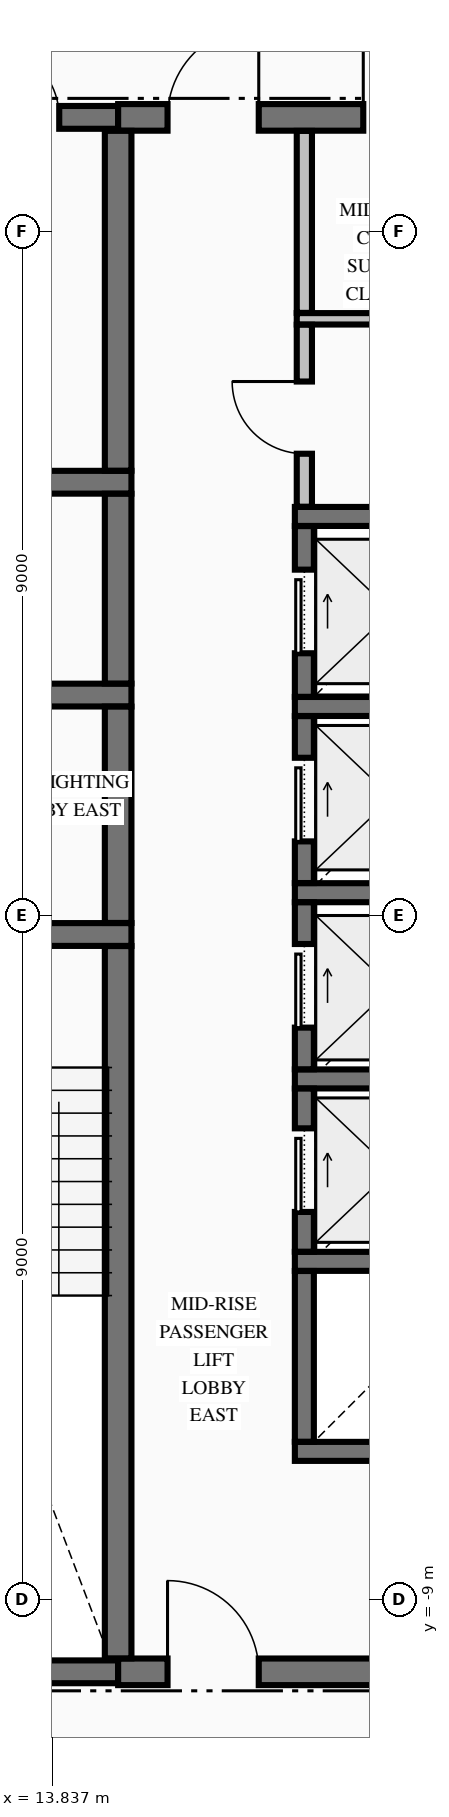
"""IFC4 building model, lengths in metres.
Left out: names, types, materials, properties, quantities, classifications, styles, units other than length and angle.
Written with IfcOpenShell. Run it as: python <this file> out.ifc"""

import sys

from ifc_helpers import new_model, si_unit, direction, frame, frame_2d, origin, place, context, subcontext, project, spatial, rectangle, extrude, element, fill, save


model = new_model("IFC4")
c1 = context("Model", 3, precision=1e-05, world=origin(), true_north=direction((0.0, 1.0)))
c2 = subcontext(c1, "Body", "Model", "MODEL_VIEW")
j1 = project(units=[si_unit("LENGTHUNIT", "METRE"), si_unit("PLANEANGLEUNIT", "RADIAN")], contexts=[c1])
p1 = place(None, origin())
s1 = spatial("IfcSite", under=j1, at=p1, CompositionType="ELEMENT")
p2 = place(p1, origin())
s2 = spatial("IfcBuilding", under=s1, at=p2, CompositionType="ELEMENT")
p3 = place(p2, frame((0.0, 0.0, 109.21)))
s3 = spatial("IfcBuildingStorey", under=s2, at=p3, CompositionType="ELEMENT", Elevation=109.21)
p4 = place(p3, frame((11.504, -9.95, 0.0), z_axis=(0.0, 0.0, 1.0), x_axis=(1.0, 0.0, 0.0)))
e1 = element("IfcWall", 1, at=p4, inside=s3, PredefinedType="SHEAR", context=c2, shape_type="SweptSolid", body=[
    extrude(rectangle(XDim=3.196, YDim=0.3, at=frame_2d((1.598, 0.0))), origin(), (0.0, 0.0, 1.0), 3.32),
])
p5 = place(p3, frame((14.7, -9.95, 0.0), z_axis=(0.0, 0.0, 1.0), x_axis=(1.0, 0.0, 0.0)))
e2 = element("IfcWall", 2, at=p5, inside=s3, PredefinedType="SHEAR", context=c2, shape_type="SweptSolid", body=[
    extrude(rectangle(XDim=4.796, YDim=0.35, at=frame_2d((2.398, 0.0))), origin(), (0.0, 0.0, 1.0), 3.32),
])
p6 = place(p5, frame((0.65, 0.0, 0.0)))
e3 = element("IfcOpeningElement", 3, at=p6, cuts=e2, PredefinedType="OPENING", context=c2, shape_type="SweptSolid", body=[
    extrude(rectangle(XDim=1.2, YDim=2.15, at=frame_2d((0.6, 1.075))), frame((0.0, 0.185, 0.0), z_axis=(0.0, -1.0, 0.0), x_axis=(1.0, 0.0, 0.0)), (0.0, 0.0, 1.0), 0.37),
])
for number, where, z_axis, x_axis in (
    (4, (17.025, -7.05, 0.0), (0.0, 0.0, 1.0), (1.0, 0.0, 0.0)),
    (5, (17.025, -4.55, 0.0), (0.0, 0.0, 1.0), (1.0, 0.0, 0.0)),
    (6, (17.025, -2.15, 0.0), (0.0, 0.0, 1.0), (1.0, 0.0, 0.0)),
):
    element("IfcWall", number, at=place(p3, frame(where, z_axis=z_axis, x_axis=x_axis)), inside=s3, PredefinedType="SOLIDWALL", context=c2, shape_type="SweptSolid", body=[
        extrude(rectangle(XDim=3.15, YDim=0.25, at=frame_2d((1.575, 0.0))), origin(), (0.0, 0.0, 1.0), 3.32),
    ])
p7 = place(p3, frame((11.504, -0.25, 0.0), z_axis=(0.0, 0.0, 1.0), x_axis=(1.0, 0.0, 0.0)))
e7 = element("IfcWall", 7, at=p7, inside=s3, PredefinedType="SHEAR", context=c2, shape_type="SweptSolid", body=[
    extrude(rectangle(XDim=3.371, YDim=0.3, at=frame_2d((1.686, 0.0))), origin(), (0.0, 0.0, 1.0), 3.32),
])
p8 = place(p7, frame((1.096, 0.0, 0.0)))
e8 = element("IfcOpeningElement", 8, at=p8, cuts=e7, PredefinedType="OPENING", context=c2, shape_type="SweptSolid", body=[
    extrude(rectangle(XDim=1.1, YDim=2.15, at=frame_2d((0.55, 1.075))), frame((0.0, 0.16, 0.0), z_axis=(0.0, -1.0, 0.0), x_axis=(1.0, 0.0, 0.0)), (0.0, 0.0, 1.0), 0.32),
])
p9 = place(p3, frame((17.025, 0.3, 0.0), z_axis=(0.0, 0.0, 1.0), x_axis=(1.0, 0.0, 0.0)))
e9 = element("IfcWall", 9, at=p9, inside=s3, PredefinedType="SOLIDWALL", context=c2, shape_type="SweptSolid", body=[
    extrude(rectangle(XDim=2.471, YDim=0.25, at=frame_2d((1.236, 0.0))), origin(), (0.0, 0.0, 1.0), 3.32),
])
p10 = place(p3, frame((17.025, 2.75, 0.0), z_axis=(0.0, 0.0, 1.0), x_axis=(1.0, 0.0, 0.0)))
e10 = element("IfcWall", 10, at=p10, inside=s3, PredefinedType="SOLIDWALL", context=c2, shape_type="SweptSolid", body=[
    extrude(rectangle(XDim=3.15, YDim=0.25, at=frame_2d((1.575, 0.0))), origin(), (0.0, 0.0, 1.0), 3.32),
])
p11 = place(p3, frame((10.85, 2.9, 0.0), z_axis=(0.0, 0.0, 1.0), x_axis=(1.0, 0.0, 0.0)))
e11 = element("IfcWall", 11, at=p11, inside=s3, PredefinedType="SHEAR", context=c2, shape_type="SweptSolid", body=[
    extrude(rectangle(XDim=4.025, YDim=0.3, at=frame_2d((2.012, 0.0))), origin(), (0.0, 0.0, 1.0), 3.32),
])
p12 = place(p11, frame((0.85, 0.0, 0.0)))
e12 = element("IfcOpeningElement", 12, at=p12, cuts=e11, PredefinedType="OPENING", context=c2, shape_type="SweptSolid", body=[
    extrude(rectangle(XDim=1.1, YDim=2.2, at=frame_2d((0.55, 1.1))), frame((0.0, 0.16, 0.0), z_axis=(0.0, -1.0, 0.0), x_axis=(1.0, 0.0, 0.0)), (0.0, 0.0, 1.0), 0.32),
])
p13 = place(p3, frame((17.025, 5.25, 0.0), z_axis=(0.0, 0.0, 1.0), x_axis=(1.0, 0.0, 0.0)))
e13 = element("IfcWall", 13, at=p13, inside=s3, PredefinedType="SOLIDWALL", context=c2, shape_type="SweptSolid", body=[
    extrude(rectangle(XDim=3.15, YDim=0.25, at=frame_2d((1.575, 0.0))), origin(), (0.0, 0.0, 1.0), 3.32),
])
p14 = place(p3, frame((10.85, 5.7, 0.0), z_axis=(0.0, 0.0, 1.0), x_axis=(1.0, 0.0, 0.0)))
e14 = element("IfcWall", 14, at=p14, inside=s3, PredefinedType="SHEAR", context=c2, shape_type="SweptSolid", body=[
    extrude(rectangle(XDim=4.025, YDim=0.3, at=frame_2d((2.012, 0.0))), origin(), (0.0, 0.0, 1.0), 3.32),
])
p15 = place(p3, frame((11.504, 10.5, 0.0), z_axis=(0.0, 0.0, 1.0), x_axis=(1.0, 0.0, 0.0)))
e15 = element("IfcWall", 15, at=p15, inside=s3, PredefinedType="SHEAR", context=c2, shape_type="SweptSolid", body=[
    extrude(rectangle(XDim=3.196, YDim=0.3, at=frame_2d((1.598, 0.0))), origin(), (0.0, 0.0, 1.0), 3.32),
])
p16 = place(p15, frame((1.471, 0.0, 0.0)))
e16 = element("IfcOpeningElement", 16, at=p16, cuts=e15, PredefinedType="OPENING", context=c2, shape_type="SweptSolid", body=[
    extrude(rectangle(XDim=0.95, YDim=2.15, at=frame_2d((0.475, 1.075))), frame((0.0, 0.16, 0.0), z_axis=(0.0, -1.0, 0.0), x_axis=(1.0, 0.0, 0.0)), (0.0, 0.0, 1.0), 0.32),
])
p17 = place(p3, frame((14.7, 10.5, 0.0), z_axis=(0.0, 0.0, 1.0), x_axis=(1.0, 0.0, 0.0)))
e17 = element("IfcWall", 17, at=p17, inside=s3, PredefinedType="SHEAR", context=c2, shape_type="SweptSolid", body=[
    extrude(rectangle(XDim=4.796, YDim=0.35, at=frame_2d((2.398, 0.0))), origin(), (0.0, 0.0, 1.0), 3.32),
])
p18 = place(p17, frame((0.65, 0.0, 0.0)))
e18 = element("IfcOpeningElement", 18, at=p18, cuts=e17, PredefinedType="OPENING", context=c2, shape_type="SweptSolid", body=[
    extrude(rectangle(XDim=1.2, YDim=2.15, at=frame_2d((0.6, 1.075))), frame((0.0, 0.185, 0.0), z_axis=(0.0, -1.0, 0.0), x_axis=(1.0, 0.0, 0.0)), (0.0, 0.0, 1.0), 0.37),
])
p19 = place(p17, frame((3.225, 0.0, 0.0)))
e19 = element("IfcOpeningElement", 19, at=p19, cuts=e17, PredefinedType="OPENING", context=c2, shape_type="SweptSolid", body=[
    extrude(rectangle(XDim=0.95, YDim=2.15, at=frame_2d((0.475, 1.075))), frame((0.0, 0.185, 0.0), z_axis=(0.0, -1.0, 0.0), x_axis=(1.0, 0.0, 0.0)), (0.0, 0.0, 1.0), 0.37),
])
p20 = place(p3, frame((17.05, 7.85, 0.0), z_axis=(0.0, 0.0, 1.0), x_axis=(1.0, 0.0, 0.0)))
e20 = element("IfcWall", 20, at=p20, inside=s3, PredefinedType="PARTITIONING", context=c2, shape_type="SweptSolid", body=[
    extrude(rectangle(XDim=2.772, YDim=0.15, at=frame_2d((1.386, 0.0))), origin(), (0.0, 0.0, 1.0), 3.32),
])
p21 = place(p3, frame((14.7, -9.773, 0.0), z_axis=(0.0, 0.0, 1.0), x_axis=(0.0, 1.0, 0.0)))
e21 = element("IfcWall", 21, at=p21, inside=s3, PredefinedType="SHEAR", context=c2, shape_type="SweptSolid", body=[
    extrude(rectangle(XDim=9.371, YDim=0.35, at=frame_2d((4.686, 0.0))), origin(), (0.0, 0.0, 1.0), 3.32),
])
p22 = place(p3, frame((14.7, -0.098, 0.0), z_axis=(0.0, 0.0, 1.0), x_axis=(0.0, 1.0, 0.0)))
e22 = element("IfcWall", 22, at=p22, inside=s3, PredefinedType="SHEAR", context=c2, shape_type="SweptSolid", body=[
    extrude(rectangle(XDim=2.846, YDim=0.35, at=frame_2d((1.423, 0.0))), origin(), (0.0, 0.0, 1.0), 3.32),
])
p23 = place(p3, frame((14.7, 3.052, 0.0), z_axis=(0.0, 0.0, 1.0), x_axis=(0.0, 1.0, 0.0)))
e23 = element("IfcWall", 23, at=p23, inside=s3, PredefinedType="SHEAR", context=c2, shape_type="SweptSolid", body=[
    extrude(rectangle(XDim=2.496, YDim=0.35, at=frame_2d((1.248, 0.0))), origin(), (0.0, 0.0, 1.0), 3.32),
])
p24 = place(p3, frame((14.7, 5.852, 0.0), z_axis=(0.0, 0.0, 1.0), x_axis=(0.0, 1.0, 0.0)))
e24 = element("IfcWall", 24, at=p24, inside=s3, PredefinedType="SHEAR", context=c2, shape_type="SweptSolid", body=[
    extrude(rectangle(XDim=4.471, YDim=0.35, at=frame_2d((2.235, 0.0))), origin(), (0.0, 0.0, 1.0), 3.32),
])
p25 = place(p3, frame((17.15, -6.923, 0.0), z_axis=(0.0, 0.0, 1.0), x_axis=(0.0, 1.0, 0.0)))
e25 = element("IfcWall", 25, at=p25, inside=s3, PredefinedType="SOLIDWALL", context=c2, shape_type="SweptSolid", body=[
    extrude(rectangle(XDim=2.246, YDim=0.25, at=frame_2d((1.123, 0.0))), origin(), (0.0, 0.0, 1.0), 3.32),
])
p26 = place(p3, frame((17.15, -4.423, 0.0), z_axis=(0.0, 0.0, 1.0), x_axis=(0.0, 1.0, 0.0)))
e26 = element("IfcWall", 26, at=p26, inside=s3, PredefinedType="SOLIDWALL", context=c2, shape_type="SweptSolid", body=[
    extrude(rectangle(XDim=2.146, YDim=0.25, at=frame_2d((1.073, 0.0))), origin(), (0.0, 0.0, 1.0), 3.32),
])
p27 = place(p26, frame((0.523, 0.0, 0.0)))
e27 = element("IfcOpeningElement", 27, at=p27, cuts=e26, PredefinedType="OPENING", context=c2, shape_type="SweptSolid", body=[
    extrude(rectangle(XDim=1.1, YDim=2.2, at=frame_2d((0.55, 1.1))), frame((0.0, 0.135, 0.0), z_axis=(0.0, -1.0, 0.0), x_axis=(1.0, 0.0, 0.0)), (0.0, 0.0, 1.0), 0.27),
])
p28 = place(p3, frame((17.15, -2.023, 0.0), z_axis=(0.0, 0.0, 1.0), x_axis=(0.0, 1.0, 0.0)))
e28 = element("IfcWall", 28, at=p28, inside=s3, PredefinedType="SOLIDWALL", context=c2, shape_type="SweptSolid", body=[
    extrude(rectangle(XDim=2.196, YDim=0.25, at=frame_2d((1.098, 0.0))), origin(), (0.0, 0.0, 1.0), 3.32),
])
p29 = place(p28, frame((0.548, 0.0, 0.0)))
e29 = element("IfcOpeningElement", 29, at=p29, cuts=e28, PredefinedType="OPENING", context=c2, shape_type="SweptSolid", body=[
    extrude(rectangle(XDim=1.1, YDim=2.2, at=frame_2d((0.55, 1.1))), frame((0.0, 0.135, 0.0), z_axis=(0.0, -1.0, 0.0), x_axis=(1.0, 0.0, 0.0)), (0.0, 0.0, 1.0), 0.27),
])
p30 = place(p3, frame((17.15, 0.427, 0.0), z_axis=(0.0, 0.0, 1.0), x_axis=(0.0, 1.0, 0.0)))
e30 = element("IfcWall", 30, at=p30, inside=s3, PredefinedType="SOLIDWALL", context=c2, shape_type="SweptSolid", body=[
    extrude(rectangle(XDim=2.196, YDim=0.25, at=frame_2d((1.098, 0.0))), origin(), (0.0, 0.0, 1.0), 3.32),
])
p31 = place(p30, frame((0.548, 0.0, 0.0)))
e31 = element("IfcOpeningElement", 31, at=p31, cuts=e30, PredefinedType="OPENING", context=c2, shape_type="SweptSolid", body=[
    extrude(rectangle(XDim=1.1, YDim=2.2, at=frame_2d((0.55, 1.1))), frame((0.0, 0.135, 0.0), z_axis=(0.0, -1.0, 0.0), x_axis=(1.0, 0.0, 0.0)), (0.0, 0.0, 1.0), 0.27),
])
p32 = place(p3, frame((17.15, 2.877, 0.0), z_axis=(0.0, 0.0, 1.0), x_axis=(0.0, 1.0, 0.0)))
e32 = element("IfcWall", 32, at=p32, inside=s3, PredefinedType="SOLIDWALL", context=c2, shape_type="SweptSolid", body=[
    extrude(rectangle(XDim=2.246, YDim=0.25, at=frame_2d((1.123, 0.0))), origin(), (0.0, 0.0, 1.0), 3.32),
])
p33 = place(p32, frame((0.573, 0.0, 0.0)))
e33 = element("IfcOpeningElement", 33, at=p33, cuts=e32, PredefinedType="OPENING", context=c2, shape_type="SweptSolid", body=[
    extrude(rectangle(XDim=1.1, YDim=2.2, at=frame_2d((0.55, 1.1))), frame((0.0, 0.135, 0.0), z_axis=(0.0, -1.0, 0.0), x_axis=(1.0, 0.0, 0.0)), (0.0, 0.0, 1.0), 0.27),
])
p34 = place(p3, frame((17.15, 5.378, 0.0), z_axis=(0.0, 0.0, 1.0), x_axis=(0.0, 1.0, 0.0)))
e34 = element("IfcWall", 34, at=p34, inside=s3, PredefinedType="PARTITIONING", context=c2, shape_type="SweptSolid", body=[
    extrude(rectangle(XDim=2.394, YDim=0.2, at=frame_2d((1.197, 0.0))), origin(), (0.0, 0.0, 1.0), 3.32),
])
p35 = place(p34, frame((0.697, 0.0, 0.0)))
e35 = element("IfcOpeningElement", 35, at=p35, cuts=e34, PredefinedType="OPENING", context=c2, shape_type="SweptSolid", body=[
    extrude(rectangle(XDim=0.95, YDim=2.15, at=frame_2d((0.475, 1.075))), frame((0.0, 0.11, 0.0), z_axis=(0.0, -1.0, 0.0), x_axis=(1.0, 0.0, 0.0)), (0.0, 0.0, 1.0), 0.22),
])
p36 = place(p3, frame((17.15, 7.928, 0.0), z_axis=(0.0, 0.0, 1.0), x_axis=(0.0, 1.0, 0.0)))
e36 = element("IfcWall", 36, at=p36, inside=s3, PredefinedType="PARTITIONING", context=c2, shape_type="SweptSolid", body=[
    extrude(rectangle(XDim=2.394, YDim=0.2, at=frame_2d((1.197, 0.0))), origin(), (0.0, 0.0, 1.0), 3.32),
])
p37 = place(p16, origin())
e37 = element("IfcDoor", 37, at=p37, inside=s3, OperationType="SINGLE_SWING_LEFT", PredefinedType="DOOR", context=c2, shape_type="SweptSolid", body=[
    extrude(rectangle(XDim=0.95, YDim=2.15, at=frame_2d((0.475, 1.075))), frame((0.0, 0.025, 0.0), z_axis=(0.0, -1.0, 0.0), x_axis=(1.0, 0.0, 0.0)), (0.0, 0.0, 1.0), 0.05),
])
fill(e16, e37)
p38 = place(p27, origin())
e38 = element("IfcDoor", 38, at=p38, inside=s3, OperationType="SLIDING_TO_RIGHT", PredefinedType="DOOR", context=c2, shape_type="SweptSolid", body=[
    extrude(rectangle(XDim=1.1, YDim=2.2, at=frame_2d((0.55, 1.1))), frame((0.0, 0.025, 0.0), z_axis=(0.0, -1.0, 0.0), x_axis=(1.0, 0.0, 0.0)), (0.0, 0.0, 1.0), 0.05),
])
fill(e27, e38)
p39 = place(p29, origin())
e39 = element("IfcDoor", 39, at=p39, inside=s3, OperationType="SLIDING_TO_RIGHT", PredefinedType="DOOR", context=c2, shape_type="SweptSolid", body=[
    extrude(rectangle(XDim=1.1, YDim=2.2, at=frame_2d((0.55, 1.1))), frame((0.0, 0.025, 0.0), z_axis=(0.0, -1.0, 0.0), x_axis=(1.0, 0.0, 0.0)), (0.0, 0.0, 1.0), 0.05),
])
fill(e29, e39)
p40 = place(p31, origin())
e40 = element("IfcDoor", 40, at=p40, inside=s3, OperationType="SLIDING_TO_RIGHT", PredefinedType="DOOR", context=c2, shape_type="SweptSolid", body=[
    extrude(rectangle(XDim=1.1, YDim=2.2, at=frame_2d((0.55, 1.1))), frame((0.0, 0.025, 0.0), z_axis=(0.0, -1.0, 0.0), x_axis=(1.0, 0.0, 0.0)), (0.0, 0.0, 1.0), 0.05),
])
fill(e31, e40)
p41 = place(p33, origin())
e41 = element("IfcDoor", 41, at=p41, inside=s3, OperationType="SLIDING_TO_RIGHT", PredefinedType="DOOR", context=c2, shape_type="SweptSolid", body=[
    extrude(rectangle(XDim=1.1, YDim=2.2, at=frame_2d((0.55, 1.1))), frame((0.0, 0.025, 0.0), z_axis=(0.0, -1.0, 0.0), x_axis=(1.0, 0.0, 0.0)), (0.0, 0.0, 1.0), 0.05),
])
fill(e33, e41)
p42 = place(p6, origin())
e42 = element("IfcDoor", 42, at=p42, inside=s3, OperationType="SINGLE_SWING_LEFT", PredefinedType="DOOR", context=c2, shape_type="SweptSolid", body=[
    extrude(rectangle(XDim=1.2, YDim=2.15, at=frame_2d((0.6, 1.075))), frame((0.0, 0.025, 0.0), z_axis=(0.0, -1.0, 0.0), x_axis=(1.0, 0.0, 0.0)), (0.0, 0.0, 1.0), 0.05),
])
fill(e3, e42)
p43 = place(p18, origin())
e43 = element("IfcDoor", 43, at=p43, inside=s3, OperationType="SINGLE_SWING_RIGHT", PredefinedType="DOOR", context=c2, shape_type="SweptSolid", body=[
    extrude(rectangle(XDim=1.2, YDim=2.15, at=frame_2d((0.6, 1.075))), frame((0.0, 0.025, 0.0), z_axis=(0.0, -1.0, 0.0), x_axis=(1.0, 0.0, 0.0)), (0.0, 0.0, 1.0), 0.05),
])
fill(e18, e43)
p44 = place(p19, origin())
e44 = element("IfcDoor", 44, at=p44, inside=s3, OperationType="SINGLE_SWING_LEFT", PredefinedType="DOOR", context=c2, shape_type="SweptSolid", body=[
    extrude(rectangle(XDim=0.95, YDim=2.15, at=frame_2d((0.475, 1.075))), frame((0.0, 0.025, 0.0), z_axis=(0.0, -1.0, 0.0), x_axis=(1.0, 0.0, 0.0)), (0.0, 0.0, 1.0), 0.05),
])
fill(e19, e44)
p45 = place(p35, origin())
e45 = element("IfcDoor", 45, at=p45, inside=s3, OperationType="SINGLE_SWING_RIGHT", PredefinedType="DOOR", context=c2, shape_type="SweptSolid", body=[
    extrude(rectangle(XDim=0.95, YDim=2.15, at=frame_2d((0.475, 1.075))), frame((0.0, 0.025, 0.0), z_axis=(0.0, -1.0, 0.0), x_axis=(1.0, 0.0, 0.0)), (0.0, 0.0, 1.0), 0.05),
])
fill(e35, e45)
save(model, sys.argv[1])
